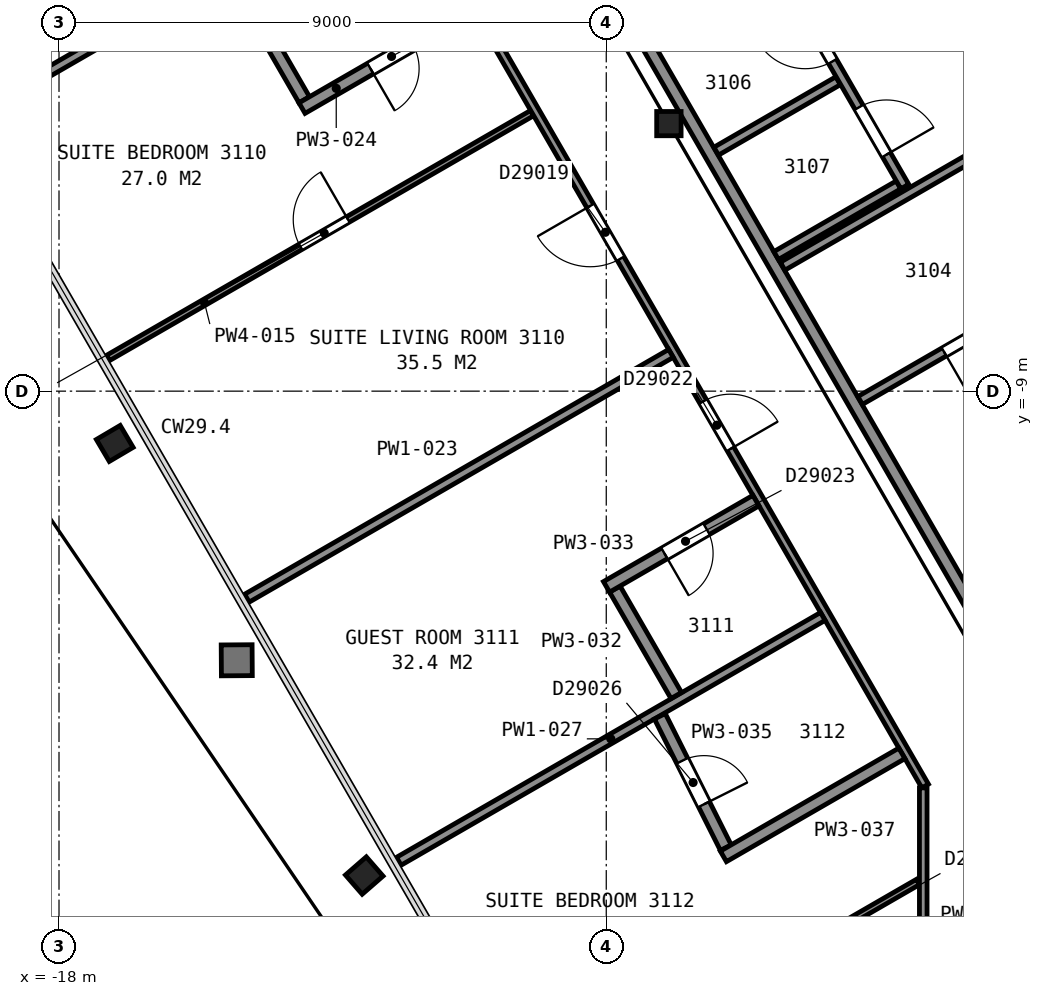
"""IFC4 building model, lengths in metres.
Left out: names, types, materials, properties, quantities, classifications, styles, units other than length and angle.
Written with IfcOpenShell. Run it as: python <this file> out.ifc"""

import sys

from ifc_helpers import new_model, si_unit, direction, frame, frame_2d, origin, origin_2d, place, context, subcontext, project, spatial, rectangle, i_section, extrude, element, fill, save


model = new_model("IFC4")
c1 = context("Model", 3, precision=1e-05, world=origin(), true_north=direction((0.0, 1.0)))
c2 = subcontext(c1, "Body", "Model", "MODEL_VIEW")
j1 = project(units=[si_unit("LENGTHUNIT", "METRE"), si_unit("PLANEANGLEUNIT", "RADIAN")], contexts=[c1])
p1 = place(None, origin())
s1 = spatial("IfcSite", under=j1, at=p1, CompositionType="ELEMENT")
p2 = place(p1, origin())
s2 = spatial("IfcBuilding", under=s1, at=p2, CompositionType="ELEMENT")
p3 = place(p2, frame((0.0, 0.0, 128.8)))
s3 = spatial("IfcBuildingStorey", under=s2, at=p3, CompositionType="ELEMENT", Elevation=128.8)
p4 = place(p3, frame((-16.886, -9.743, 0.035), z_axis=(-0.166257050151, -0.0981255896, 0.981188035975), x_axis=(-0.500024449769, 0.866009245638, 0.001880452815)))
e1 = element("IfcColumn", 1, at=p4, inside=s3, PredefinedType="COLUMN", context=c2, shape_type="SweptSolid", body=[
    extrude(i_section(OverallWidth=0.419, OverallDepth=0.455, WebThickness=0.042, FlangeThickness=0.068, FilletRadius=0.015, at=origin_2d()), origin(), (0.0, 0.0, 1.0), 3.598),
])
p5 = place(p3, frame((-12.806, -16.815, 0.04), z_axis=(-0.147138437405, -0.128091390491, 0.980786865695), x_axis=(-0.499727465286, 0.865346759384, 0.038045321162)))
e2 = element("IfcColumn", 2, at=p5, inside=s3, PredefinedType="COLUMN", context=c2, shape_type="SweptSolid", body=[
    extrude(i_section(OverallWidth=0.419, OverallDepth=0.455, WebThickness=0.042, FlangeThickness=0.068, FilletRadius=0.015, at=origin_2d()), origin(), (0.0, 0.0, 1.0), 3.589),
])
p6 = place(p3, frame((-7.97, -4.6, 0.0), z_axis=(0.0, 0.0, 1.0), x_axis=(1.0, 0.0, 0.0)))
e3 = element("IfcColumn", 3, at=p6, inside=s3, PredefinedType="COLUMN", context=c2, shape_type="SweptSolid", body=[
    extrude(i_section(OverallWidth=0.401, OverallDepth=0.399, WebThickness=0.025, FlangeThickness=0.04, FilletRadius=0.015, at=origin_2d()), origin(), (0.0, 0.0, 1.0), 3.6),
])
p7 = place(p3, frame((-13.664, 5.946, 0.0), z_axis=(0.0, 0.0, 1.0), x_axis=(0.499994327219, -0.866028678941, 0.0)))
e4 = element("IfcWall", 4, at=p7, inside=s3, PredefinedType="PARTITIONING", context=c2, shape_type="SweptSolid", body=[
    extrude(rectangle(XDim=23.968, YDim=0.2, at=frame_2d((11.984, 0.0))), origin(), (0.0, 0.0, 1.0), 3.35),
])
p8 = place(p3, frame((-7.192, -5.053, 0.0), z_axis=(0.0, 0.0, 1.0), x_axis=(0.865851878631, 0.500300434011, 0.0)))
e5 = element("IfcWall", 5, at=p8, inside=s3, PredefinedType="PARTITIONING", context=c2, shape_type="SweptSolid", body=[
    extrude(rectangle(XDim=2.315, YDim=0.15, at=frame_2d((1.158, 0.0))), origin(), (0.0, 0.0, 1.0), 3.35),
])
p9 = place(p3, frame((-6.206, -6.77, 0.0), z_axis=(0.0, 0.0, 1.0), x_axis=(0.865998469481, 0.500046648681, 0.0)))
e6 = element("IfcWall", 6, at=p9, inside=s3, PredefinedType="PARTITIONING", context=c2, shape_type="SweptSolid", body=[
    extrude(rectangle(XDim=2.325, YDim=0.15, at=frame_2d((1.163, 0.0))), origin(), (0.0, 0.0, 1.0), 3.35),
])
p10 = place(p3, frame((-6.1, -6.946, 0.0), z_axis=(0.0, 0.0, 1.0), x_axis=(0.866038200431, 0.499977834903, 0.0)))
e7 = element("IfcWall", 7, at=p10, inside=s3, PredefinedType="PARTITIONING", context=c2, shape_type="SweptSolid", body=[
    extrude(rectangle(XDim=4.22, YDim=0.15, at=frame_2d((2.11, 0.0))), origin(), (0.0, 0.0, 1.0), 3.35),
])
p11 = place(p3, frame((-4.091, -5.635, 0.0), z_axis=(0.0, 0.0, 1.0), x_axis=(-0.499948934428, 0.866054884499, 0.0)))
e8 = element("IfcWall", 8, at=p11, inside=s3, PredefinedType="PARTITIONING", context=c2, shape_type="SweptSolid", body=[
    extrude(rectangle(XDim=3.577, YDim=0.15, at=frame_2d((1.789, 0.0))), origin(), (0.0, 0.0, 1.0), 3.35),
])
p12 = place(p11, frame((2.377, 0.0, 0.0)))
e9 = element("IfcOpeningElement", 9, at=p12, cuts=e8, PredefinedType="OPENING", context=c2, shape_type="SweptSolid", body=[
    extrude(rectangle(XDim=0.9, YDim=2.1, at=frame_2d((0.45, 1.05))), frame((0.0, 0.085, 0.0), z_axis=(0.0, -1.0, 0.0), x_axis=(1.0, 0.0, 0.0)), (0.0, 0.0, 1.0), 0.17),
])
p13 = place(p11, frame((0.605, 0.0, 0.0)))
e10 = element("IfcOpeningElement", 10, at=p13, cuts=e8, PredefinedType="OPENING", context=c2, shape_type="SweptSolid", body=[
    extrude(rectangle(XDim=0.9, YDim=2.1, at=frame_2d((0.45, 1.05))), frame((0.0, 0.085, 0.0), z_axis=(0.0, -1.0, 0.0), x_axis=(1.0, 0.0, 0.0)), (0.0, 0.0, 1.0), 0.17),
])
p14 = place(p3, frame((-4.825, -9.154, 0.0), z_axis=(0.0, 0.0, 1.0), x_axis=(0.866023738697, 0.500002884005, 0.0)))
e11 = element("IfcWall", 11, at=p14, inside=s3, PredefinedType="PARTITIONING", context=c2, shape_type="SweptSolid", body=[
    extrude(rectangle(XDim=4.22, YDim=0.15, at=frame_2d((2.11, 0.0))), origin(), (0.0, 0.0, 1.0), 3.35),
])
p15 = place(p14, frame((1.595, 0.0, 0.0)))
e12 = element("IfcOpeningElement", 12, at=p15, cuts=e11, PredefinedType="OPENING", context=c2, shape_type="SweptSolid", body=[
    extrude(rectangle(XDim=0.9, YDim=2.1, at=frame_2d((0.45, 1.05))), frame((0.0, 0.085, 0.0), z_axis=(0.0, -1.0, 0.0), x_axis=(1.0, 0.0, 0.0)), (0.0, 0.0, 1.0), 0.17),
])
p16 = place(p3, frame((-19.473, -4.501, 0.0), z_axis=(0.0, 0.0, 1.0), x_axis=(0.866005217449, 0.50003496213, 0.0)))
e13 = element("IfcWall", 13, at=p16, inside=s3, PredefinedType="PARTITIONING", context=c2, shape_type="SweptSolid", body=[
    extrude(rectangle(XDim=8.047, YDim=0.15, at=frame_2d((4.024, 0.0))), origin(), (0.0, 0.0, 1.0), 2.613),
])
p17 = place(p3, frame((-17.192, -8.453, 0.0), z_axis=(0.0, 0.0, 1.0), x_axis=(0.865999665789, 0.500044576866, 0.0)))
e14 = element("IfcWall", 14, at=p17, inside=s3, PredefinedType="PARTITIONING", context=c2, shape_type="SweptSolid", body=[
    extrude(rectangle(XDim=8.048, YDim=0.1, at=frame_2d((4.024, 0.0))), origin(), (0.0, 0.0, 1.0), 2.613),
])
p18 = place(p17, frame((3.654, 0.0, 0.0)))
e15 = element("IfcOpeningElement", 15, at=p18, cuts=e14, PredefinedType="OPENING", context=c2, shape_type="SweptSolid", body=[
    extrude(rectangle(XDim=0.9, YDim=2.1, at=frame_2d((0.45, 1.05))), frame((0.0, 0.06, 0.0), z_axis=(0.0, -1.0, 0.0), x_axis=(1.0, 0.0, 0.0)), (0.0, 0.0, 1.0), 0.12),
])
p19 = place(p3, frame((-3.756, -15.494, 0.0), z_axis=(0.0, 0.0, 1.0), x_axis=(-0.500027787016, 0.866009360349, 0.0)))
e16 = element("IfcWall", 16, at=p19, inside=s3, PredefinedType="PARTITIONING", context=c2, shape_type="SweptSolid", body=[
    extrude(rectangle(XDim=23.856, YDim=0.125, at=frame_2d((11.928, 0.0))), origin(), (0.0, 0.0, 1.0), 2.613),
])
p20 = place(p19, frame((10.016, 0.0, 0.0)))
e17 = element("IfcOpeningElement", 17, at=p20, cuts=e16, PredefinedType="OPENING", context=c2, shape_type="SweptSolid", body=[
    extrude(rectangle(XDim=1.0, YDim=2.1, at=frame_2d((0.5, 1.05))), frame((0.0, 0.073, 0.0), z_axis=(0.0, -1.0, 0.0), x_axis=(1.0, 0.0, 0.0)), (0.0, 0.0, 1.0), 0.145),
])
p21 = place(p19, frame((6.402, 0.0, 0.0)))
e18 = element("IfcOpeningElement", 18, at=p21, cuts=e16, PredefinedType="OPENING", context=c2, shape_type="SweptSolid", body=[
    extrude(rectangle(XDim=0.9, YDim=2.1, at=frame_2d((0.45, 1.05))), frame((0.0, 0.073, 0.0), z_axis=(0.0, -1.0, 0.0), x_axis=(1.0, 0.0, 0.0)), (0.0, 0.0, 1.0), 0.145),
])
p22 = place(p3, frame((-15.177, -2.113, 0.0), z_axis=(0.0, 0.0, 1.0), x_axis=(0.500196916118, -0.865911684357, 0.0)))
e19 = element("IfcWall", 19, at=p22, inside=s3, PredefinedType="PARTITIONING", context=c2, shape_type="SweptSolid", body=[
    extrude(rectangle(XDim=2.42, YDim=0.2, at=frame_2d((1.21, 0.0))), origin(), (0.0, 0.0, 1.0), 2.613),
])
p23 = place(p3, frame((-14.91, -12.405, 0.0), z_axis=(0.0, 0.0, 1.0), x_axis=(0.866044217767, 0.499967411811, 0.0)))
e20 = element("IfcWall", 20, at=p23, inside=s3, PredefinedType="PARTITIONING", context=c2, shape_type="SweptSolid", body=[
    extrude(rectangle(XDim=8.052, YDim=0.15, at=frame_2d((4.026, 0.0))), origin(), (0.0, 0.0, 1.0), 2.613),
])
p24 = place(p3, frame((-14.004, -4.345, 0.0), z_axis=(0.0, 0.0, 1.0), x_axis=(0.866016035791, 0.500016225489, 0.0)))
e21 = element("IfcWall", 21, at=p24, inside=s3, PredefinedType="PARTITIONING", context=c2, shape_type="SweptSolid", body=[
    extrude(rectangle(XDim=3.237, YDim=0.2, at=frame_2d((1.619, 0.0))), origin(), (0.0, 0.0, 1.0), 2.613),
])
p25 = place(p24, frame((1.3, 0.0, 0.0)))
e22 = element("IfcOpeningElement", 22, at=p25, cuts=e21, PredefinedType="OPENING", context=c2, shape_type="SweptSolid", body=[
    extrude(rectangle(XDim=0.8, YDim=2.1, at=frame_2d((0.4, 1.05))), frame((0.0, 0.11, 0.0), z_axis=(0.0, -1.0, 0.0), x_axis=(1.0, 0.0, 0.0)), (0.0, 0.0, 1.0), 0.22),
])
p26 = place(p3, frame((-12.412, -16.732, 0.0), z_axis=(0.0, 0.0, 1.0), x_axis=(0.865997251595, 0.500048757853, 0.0)))
e23 = element("IfcWall", 23, at=p26, inside=s3, PredefinedType="PARTITIONING", context=c2, shape_type="SweptSolid", body=[
    extrude(rectangle(XDim=8.052, YDim=0.15, at=frame_2d((4.026, 0.0))), origin(), (0.0, 0.0, 1.0), 2.613),
])
p27 = place(p3, frame((-10.13, -20.684, 0.0), z_axis=(0.0, 0.0, 1.0), x_axis=(0.866023480589, 0.500003331057, 0.0)))
e24 = element("IfcWall", 24, at=p27, inside=s3, PredefinedType="PARTITIONING", context=c2, shape_type="SweptSolid", body=[
    extrude(rectangle(XDim=7.223, YDim=0.1, at=frame_2d((3.612, 0.0))), origin(), (0.0, 0.0, 1.0), 2.613),
])
p28 = place(p27, frame((3.254, 0.0, 0.0)))
e25 = element("IfcOpeningElement", 25, at=p28, cuts=e24, PredefinedType="OPENING", context=c2, shape_type="SweptSolid", body=[
    extrude(rectangle(XDim=0.9, YDim=2.1, at=frame_2d((0.45, 1.05))), frame((0.0, 0.06, 0.0), z_axis=(0.0, -1.0, 0.0), x_axis=(1.0, 0.0, 0.0)), (0.0, 0.0, 1.0), 0.12),
])
p29 = place(p3, frame((-8.859, -12.256, 0.0), z_axis=(0.0, 0.0, 1.0), x_axis=(0.499868889286, -0.866101087359, 0.0)))
e26 = element("IfcWall", 26, at=p29, inside=s3, PredefinedType="PARTITIONING", context=c2, shape_type="SweptSolid", body=[
    extrude(rectangle(XDim=2.021, YDim=0.2, at=frame_2d((1.01, 0.0))), origin(), (0.0, 0.0, 1.0), 2.613),
])
p30 = place(p3, frame((-6.538, -10.8, 0.0), z_axis=(0.0, 0.0, 1.0), x_axis=(-0.866048046904, -0.499960778915, 0.0)))
e27 = element("IfcWall", 27, at=p30, inside=s3, PredefinedType="PARTITIONING", context=c2, shape_type="SweptSolid", body=[
    extrude(rectangle(XDim=2.838, YDim=0.2, at=frame_2d((1.419, 0.0))), origin(), (0.0, 0.0, 1.0), 2.613),
])
p31 = place(p30, frame((0.938, 0.0, 0.0)))
e28 = element("IfcOpeningElement", 28, at=p31, cuts=e27, PredefinedType="OPENING", context=c2, shape_type="SweptSolid", body=[
    extrude(rectangle(XDim=0.8, YDim=2.1, at=frame_2d((0.4, 1.05))), frame((0.0, 0.11, 0.0), z_axis=(0.0, -1.0, 0.0), x_axis=(1.0, 0.0, 0.0)), (0.0, 0.0, 1.0), 0.22),
])
p32 = place(p3, frame((-8.119, -14.347, 0.0), z_axis=(0.0, 0.0, 1.0), x_axis=(0.448586498331, -0.893739421484, 0.0)))
e29 = element("IfcWall", 29, at=p32, inside=s3, PredefinedType="PARTITIONING", context=c2, shape_type="SweptSolid", body=[
    extrude(rectangle(XDim=2.417, YDim=0.2, at=frame_2d((1.209, 0.0))), origin(), (0.0, 0.0, 1.0), 2.613),
])
p33 = place(p32, frame((0.819, 0.0, 0.0)))
e30 = element("IfcOpeningElement", 30, at=p33, cuts=e29, PredefinedType="OPENING", context=c2, shape_type="SweptSolid", body=[
    extrude(rectangle(XDim=0.8, YDim=2.1, at=frame_2d((0.4, 1.05))), frame((0.0, 0.11, 0.0), z_axis=(0.0, -1.0, 0.0), x_axis=(1.0, 0.0, 0.0)), (0.0, 0.0, 1.0), 0.22),
])
p34 = place(p3, frame((-7.073, -16.652, 0.0), z_axis=(0.0, 0.0, 1.0), x_axis=(0.866009256036, 0.500027967679, 0.0)))
e31 = element("IfcWall", 31, at=p34, inside=s3, PredefinedType="PARTITIONING", context=c2, shape_type="SweptSolid", body=[
    extrude(rectangle(XDim=3.389, YDim=0.2, at=frame_2d((1.695, 0.0))), origin(), (0.0, 0.0, 1.0), 2.613),
])
p35 = place(p3, frame((-3.787, -22.722, 0.0), z_axis=(0.0, 0.0, 1.0), x_axis=(0.0, 1.0, 0.0)))
e32 = element("IfcWall", 32, at=p35, inside=s3, PredefinedType="PARTITIONING", context=c2, shape_type="SweptSolid", body=[
    extrude(rectangle(XDim=7.197, YDim=0.125, at=frame_2d((3.599, 0.0))), origin(), (0.0, 0.0, 1.0), 2.613),
])
p36 = place(p35, frame((2.58, 0.0, 0.0)))
e33 = element("IfcOpeningElement", 33, at=p36, cuts=e32, PredefinedType="OPENING", context=c2, shape_type="SweptSolid", body=[
    extrude(rectangle(XDim=1.0, YDim=2.1, at=frame_2d((0.5, 1.05))), frame((0.0, 0.073, 0.0), z_axis=(0.0, -1.0, 0.0), x_axis=(1.0, 0.0, 0.0)), (0.0, 0.0, 1.0), 0.145),
])
p37 = place(p12, origin())
e34 = element("IfcDoor", 34, at=p37, inside=s3, OperationType="SINGLE_SWING_RIGHT", PredefinedType="DOOR", context=c2, shape_type="SweptSolid", body=[
    extrude(rectangle(XDim=0.9, YDim=2.1, at=frame_2d((0.45, 1.05))), frame((0.0, 0.025, 0.0), z_axis=(0.0, -1.0, 0.0), x_axis=(1.0, 0.0, 0.0)), (0.0, 0.0, 1.0), 0.05),
])
fill(e9, e34)
p38 = place(p13, origin())
e35 = element("IfcDoor", 35, at=p38, inside=s3, OperationType="SINGLE_SWING_LEFT", PredefinedType="DOOR", context=c2, shape_type="SweptSolid", body=[
    extrude(rectangle(XDim=0.9, YDim=2.1, at=frame_2d((0.45, 1.05))), frame((0.0, 0.025, 0.0), z_axis=(0.0, -1.0, 0.0), x_axis=(1.0, 0.0, 0.0)), (0.0, 0.0, 1.0), 0.05),
])
fill(e10, e35)
p39 = place(p15, origin())
e36 = element("IfcDoor", 36, at=p39, inside=s3, OperationType="SINGLE_SWING_LEFT", PredefinedType="DOOR", context=c2, shape_type="SweptSolid", body=[
    extrude(rectangle(XDim=0.9, YDim=2.1, at=frame_2d((0.45, 1.05))), frame((0.0, 0.025, 0.0), z_axis=(0.0, -1.0, 0.0), x_axis=(1.0, 0.0, 0.0)), (0.0, 0.0, 1.0), 0.05),
])
fill(e12, e36)
p40 = place(p18, origin())
e37 = element("IfcDoor", 37, at=p40, inside=s3, OperationType="SINGLE_SWING_RIGHT", PredefinedType="DOOR", context=c2, shape_type="SweptSolid", body=[
    extrude(rectangle(XDim=0.9, YDim=2.1, at=frame_2d((0.45, 1.05))), frame((0.0, 0.025, 0.0), z_axis=(0.0, -1.0, 0.0), x_axis=(1.0, 0.0, 0.0)), (0.0, 0.0, 1.0), 0.05),
])
fill(e15, e37)
p41 = place(p20, origin())
e38 = element("IfcDoor", 38, at=p41, inside=s3, OperationType="SINGLE_SWING_RIGHT", PredefinedType="DOOR", context=c2, shape_type="SweptSolid", body=[
    extrude(rectangle(XDim=1.0, YDim=2.1, at=frame_2d((0.5, 1.05))), frame((0.0, 0.025, 0.0), z_axis=(0.0, -1.0, 0.0), x_axis=(1.0, 0.0, 0.0)), (0.0, 0.0, 1.0), 0.05),
])
fill(e17, e38)
p42 = place(p21, origin())
e39 = element("IfcDoor", 39, at=p42, inside=s3, OperationType="SINGLE_SWING_LEFT", PredefinedType="DOOR", context=c2, shape_type="SweptSolid", body=[
    extrude(rectangle(XDim=0.9, YDim=2.1, at=frame_2d((0.45, 1.05))), frame((0.0, 0.025, 0.0), z_axis=(0.0, -1.0, 0.0), x_axis=(1.0, 0.0, 0.0)), (0.0, 0.0, 1.0), 0.05),
])
fill(e18, e39)
p43 = place(p25, origin())
e40 = element("IfcDoor", 40, at=p43, inside=s3, OperationType="SINGLE_SWING_LEFT", PredefinedType="DOOR", context=c2, shape_type="SweptSolid", body=[
    extrude(rectangle(XDim=0.8, YDim=2.1, at=frame_2d((0.4, 1.05))), frame((0.0, 0.025, 0.0), z_axis=(0.0, -1.0, 0.0), x_axis=(1.0, 0.0, 0.0)), (0.0, 0.0, 1.0), 0.05),
])
fill(e22, e40)
p44 = place(p31, origin())
e41 = element("IfcDoor", 41, at=p44, inside=s3, OperationType="SINGLE_SWING_RIGHT", PredefinedType="DOOR", context=c2, shape_type="SweptSolid", body=[
    extrude(rectangle(XDim=0.8, YDim=2.1, at=frame_2d((0.4, 1.05))), frame((0.0, 0.025, 0.0), z_axis=(0.0, -1.0, 0.0), x_axis=(1.0, 0.0, 0.0)), (0.0, 0.0, 1.0), 0.05),
])
fill(e28, e41)
p45 = place(p33, origin())
e42 = element("IfcDoor", 42, at=p45, inside=s3, OperationType="SINGLE_SWING_RIGHT", PredefinedType="DOOR", context=c2, shape_type="SweptSolid", body=[
    extrude(rectangle(XDim=0.8, YDim=2.1, at=frame_2d((0.4, 1.05))), frame((0.0, 0.025, 0.0), z_axis=(0.0, -1.0, 0.0), x_axis=(1.0, 0.0, 0.0)), (0.0, 0.0, 1.0), 0.05),
])
fill(e30, e42)
save(model, sys.argv[1])
